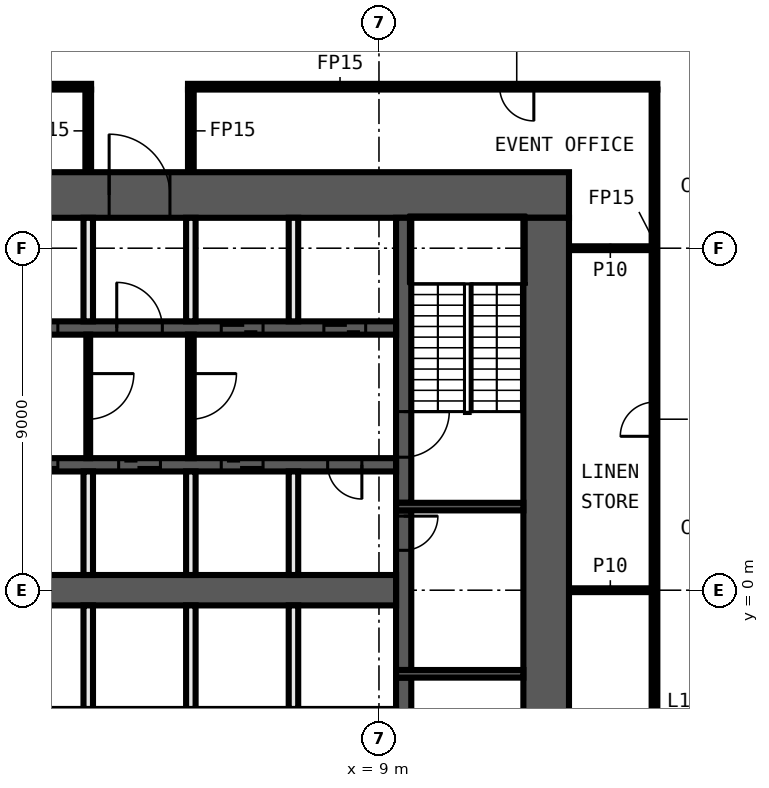
"""IFC4 building model, lengths in metres.
Left out: names, types, materials, properties, quantities, classifications, styles, units other than length and angle.
Written with IfcOpenShell. Run it as: python <this file> out.ifc"""

import sys

from ifc_helpers import new_model, si_unit, direction, frame, frame_2d, origin, place, context, subcontext, project, spatial, rectangle, extrude, element, fill, save


model = new_model("IFC4")
c1 = context("Model", 3, precision=1e-05, world=origin(), true_north=direction((0.0, 1.0)))
c2 = subcontext(c1, "Body", "Model", "MODEL_VIEW")
j1 = project(units=[si_unit("LENGTHUNIT", "METRE"), si_unit("PLANEANGLEUNIT", "RADIAN")], contexts=[c1])
p1 = place(None, origin())
s1 = spatial("IfcSite", under=j1, at=p1, CompositionType="ELEMENT")
p2 = place(p1, origin())
s2 = spatial("IfcBuilding", under=s1, at=p2, CompositionType="ELEMENT")
p3 = place(p2, frame((0.0, 0.0, 84.7)))
s3 = spatial("IfcBuildingStorey", under=s2, at=p3, CompositionType="ELEMENT", Elevation=84.7)
for number, where, z_axis, x_axis in (
    (1, (14.0, 0.0, 0.0), (0.0, 0.0, 1.0), (1.0, 0.0, 0.0)),
    (2, (14.0, 9.0, 0.0), (0.0, 0.0, 1.0), (1.0, 0.0, 0.0)),
):
    element("IfcWall", number, at=place(p3, frame(where, z_axis=z_axis, x_axis=x_axis)), inside=s3, PredefinedType="PARTITIONING", context=c2, shape_type="SweptSolid", body=[
        extrude(rectangle(XDim=2.175, YDim=0.1, at=frame_2d((1.087, 0.0))), origin(), (0.0, 0.0, 1.0), 3.9),
    ])
p4 = place(p3, frame((1.425, 13.25, 0.0), z_axis=(0.0, 0.0, 1.0), x_axis=(-1.0, 0.0, 0.0)))
e3 = element("IfcWall", 3, at=p4, inside=s3, PredefinedType="PARTITIONING", context=c2, shape_type="SweptSolid", body=[
    extrude(rectangle(XDim=17.75, YDim=0.15, at=frame_2d((8.875, 0.0))), origin(), (0.0, 0.0, 1.0), 3.9),
])
p5 = place(p4, frame((5.475, 0.0, 0.0)))
e4 = element("IfcOpeningElement", 4, at=p5, cuts=e3, PredefinedType="OPENING", context=c2, shape_type="SweptSolid", body=[
    extrude(rectangle(XDim=0.9, YDim=2.1, at=frame_2d((0.45, 1.05))), frame((0.0, 0.085, 0.0), z_axis=(0.0, -1.0, 0.0), x_axis=(1.0, 0.0, 0.0)), (0.0, 0.0, 1.0), 0.17),
])
p6 = place(p4, frame((13.6, 0.0, 0.0)))
e5 = element("IfcOpeningElement", 5, at=p6, cuts=e3, PredefinedType="OPENING", context=c2, shape_type="SweptSolid", body=[
    extrude(rectangle(XDim=0.9, YDim=2.1, at=frame_2d((0.45, 1.05))), frame((0.0, 0.085, 0.0), z_axis=(0.0, -1.0, 0.0), x_axis=(1.0, 0.0, 0.0)), (0.0, 0.0, 1.0), 0.17),
])
p7 = place(p3, frame((16.325, 13.25, 0.0), z_axis=(0.0, 0.0, 1.0), x_axis=(-1.0, 0.0, 0.0)))
e6 = element("IfcWall", 6, at=p7, inside=s3, PredefinedType="PARTITIONING", context=c2, shape_type="SweptSolid", body=[
    extrude(rectangle(XDim=12.35, YDim=0.15, at=frame_2d((6.175, 0.0))), origin(), (0.0, 0.0, 1.0), 3.9),
])
p8 = place(p7, frame((3.25, 0.0, 0.0)))
e7 = element("IfcOpeningElement", 7, at=p8, cuts=e6, PredefinedType="OPENING", context=c2, shape_type="SweptSolid", body=[
    extrude(rectangle(XDim=0.9, YDim=2.1, at=frame_2d((0.45, 1.05))), frame((0.0, 0.085, 0.0), z_axis=(0.0, -1.0, 0.0), x_axis=(1.0, 0.0, 0.0)), (0.0, 0.0, 1.0), 0.17),
])
p9 = place(p3, frame((16.25, -13.175, 0.0), z_axis=(0.0, 0.0, 1.0), x_axis=(0.0, 1.0, 0.0)))
e8 = element("IfcWall", 8, at=p9, inside=s3, PredefinedType="PARTITIONING", context=c2, shape_type="SweptSolid", body=[
    extrude(rectangle(XDim=26.35, YDim=0.15, at=frame_2d((13.175, 0.0))), origin(), (0.0, 0.0, 1.0), 3.9),
])
p10 = place(p9, frame((8.225, 0.0, 0.0)))
e9 = element("IfcOpeningElement", 9, at=p10, cuts=e8, PredefinedType="OPENING", context=c2, shape_type="SweptSolid", body=[
    extrude(rectangle(XDim=0.9, YDim=2.1, at=frame_2d((0.45, 1.05))), frame((0.0, 0.085, 0.0), z_axis=(0.0, -1.0, 0.0), x_axis=(1.0, 0.0, 0.0)), (0.0, 0.0, 1.0), 0.17),
])
p11 = place(p9, frame((17.225, 0.0, 0.0)))
e10 = element("IfcOpeningElement", 10, at=p11, cuts=e8, PredefinedType="OPENING", context=c2, shape_type="SweptSolid", body=[
    extrude(rectangle(XDim=0.9, YDim=2.1, at=frame_2d((0.45, 1.05))), frame((0.0, 0.085, 0.0), z_axis=(0.0, -1.0, 0.0), x_axis=(1.0, 0.0, 0.0)), (0.0, 0.0, 1.0), 0.17),
])
for number, where, z_axis, x_axis in (
    (11, (4.05, 11.0, 0.0), (0.0, 0.0, 1.0), (0.0, 1.0, 0.0)),
    (12, (1.35, 11.0, 0.0), (0.0, 0.0, 1.0), (0.0, 1.0, 0.0)),
):
    element("IfcWall", number, at=place(p3, frame(where, z_axis=z_axis, x_axis=x_axis)), inside=s3, PredefinedType="PARTITIONING", context=c2, shape_type="SweptSolid", body=[
        extrude(rectangle(XDim=2.175, YDim=0.15, at=frame_2d((1.087, 0.0))), origin(), (0.0, 0.0, 1.0), 3.9),
    ])
p12 = place(p3, frame((-14.0, 10.4, 0.0), z_axis=(0.0, 0.0, 1.0), x_axis=(1.0, 0.0, 0.0)))
e13 = element("IfcWall", 13, at=p12, inside=s3, PredefinedType="SHEAR", context=c2, shape_type="SweptSolid", body=[
    extrude(rectangle(XDim=28.0, YDim=1.2, at=frame_2d((14.0, 0.0))), origin(), (0.0, 0.0, 1.0), 3.9),
])
p13 = place(p12, frame((15.9, 0.0, 0.0)))
e14 = element("IfcOpeningElement", 14, at=p13, cuts=e13, PredefinedType="OPENING", context=c2, shape_type="SweptSolid", body=[
    extrude(rectangle(XDim=1.6, YDim=2.1, at=frame_2d((0.8, 1.05))), frame((0.0, 0.61, 0.0), z_axis=(0.0, -1.0, 0.0), x_axis=(1.0, 0.0, 0.0)), (0.0, 0.0, 1.0), 1.22),
])
p14 = place(p3, frame((13.4, 9.8, 0.0), z_axis=(0.0, 0.0, 1.0), x_axis=(0.0, -1.0, 0.0)))
e15 = element("IfcWall", 15, at=p14, inside=s3, PredefinedType="SHEAR", context=c2, shape_type="SweptSolid", body=[
    extrude(rectangle(XDim=19.6, YDim=1.2, at=frame_2d((9.8, 0.0))), origin(), (0.0, 0.0, 1.0), 3.9),
])
p15 = place(p3, frame((9.65, -2.3, 0.0), z_axis=(0.0, 0.0, 1.0), x_axis=(0.0, -1.0, 0.0)))
e16 = element("IfcWall", 16, at=p15, inside=s3, PredefinedType="SHEAR", context=c2, shape_type="SweptSolid", body=[
    extrude(rectangle(XDim=7.5, YDim=0.4, at=frame_2d((3.75, 0.0))), origin(), (0.0, 0.0, 1.0), 3.9),
])
p16 = place(p15, frame((1.2, 0.0, 0.0)))
e17 = element("IfcOpeningElement", 17, at=p16, cuts=e16, PredefinedType="OPENING", context=c2, shape_type="SweptSolid", body=[
    extrude(rectangle(XDim=1.2, YDim=2.1, at=frame_2d((0.6, 1.05))), frame((0.0, 0.21, 0.0), z_axis=(0.0, -1.0, 0.0), x_axis=(1.0, 0.0, 0.0)), (0.0, 0.0, 1.0), 0.42),
])
p17 = place(p3, frame((9.65, 2.1, 0.0), z_axis=(0.0, 0.0, 1.0), x_axis=(0.0, -1.0, 0.0)))
e18 = element("IfcWall", 18, at=p17, inside=s3, PredefinedType="SHEAR", context=c2, shape_type="SweptSolid", body=[
    extrude(rectangle(XDim=4.2, YDim=0.4, at=frame_2d((2.1, 0.0))), origin(), (0.0, 0.0, 1.0), 3.9),
])
p18 = place(p17, frame((0.15, 0.0, 0.0)))
e19 = element("IfcOpeningElement", 19, at=p18, cuts=e18, PredefinedType="OPENING", context=c2, shape_type="SweptSolid", body=[
    extrude(rectangle(XDim=0.9, YDim=2.1, at=frame_2d((0.45, 1.05))), frame((0.0, 0.21, 0.0), z_axis=(0.0, -1.0, 0.0), x_axis=(1.0, 0.0, 0.0)), (0.0, 0.0, 1.0), 0.42),
])
p19 = place(p3, frame((9.65, 9.8, 0.0), z_axis=(0.0, 0.0, 1.0), x_axis=(0.0, -1.0, 0.0)))
e20 = element("IfcWall", 20, at=p19, inside=s3, PredefinedType="SHEAR", context=c2, shape_type="SweptSolid", body=[
    extrude(rectangle(XDim=7.5, YDim=0.4, at=frame_2d((3.75, 0.0))), origin(), (0.0, 0.0, 1.0), 3.9),
])
p20 = place(p19, frame((5.1, 0.0, 0.0)))
e21 = element("IfcOpeningElement", 21, at=p20, cuts=e20, PredefinedType="OPENING", context=c2, shape_type="SweptSolid", body=[
    extrude(rectangle(XDim=1.2, YDim=2.1, at=frame_2d((0.6, 1.05))), frame((0.0, 0.21, 0.0), z_axis=(0.0, -1.0, 0.0), x_axis=(1.0, 0.0, 0.0)), (0.0, 0.0, 1.0), 0.42),
])
for number, where, z_axis, x_axis in (
    (22, (9.45, 2.2, 0.0), (0.0, 0.0, 1.0), (1.0, 0.0, 0.0)),
    (23, (9.45, -2.2, 0.0), (0.0, 0.0, 1.0), (1.0, 0.0, 0.0)),
):
    element("IfcWall", number, at=place(p3, frame(where, z_axis=z_axis, x_axis=x_axis)), inside=s3, PredefinedType="SHEAR", context=c2, shape_type="SweptSolid", body=[
        extrude(rectangle(XDim=3.35, YDim=0.2, at=frame_2d((1.675, 0.0))), origin(), (0.0, 0.0, 1.0), 3.9),
    ])
p21 = place(p3, frame((-9.45, 6.9, 0.0), z_axis=(0.0, 0.0, 1.0), x_axis=(1.0, 0.0, 0.0)))
e24 = element("IfcWall", 24, at=p21, inside=s3, PredefinedType="SHEAR", context=c2, shape_type="SweptSolid", body=[
    extrude(rectangle(XDim=18.9, YDim=0.35, at=frame_2d((9.45, 0.0))), origin(), (0.0, 0.0, 1.0), 3.9),
])
p22 = place(p21, frame((0.8, 0.0, 0.0)))
e25 = element("IfcOpeningElement", 25, at=p22, cuts=e24, PredefinedType="OPENING", context=c2, shape_type="SweptSolid", body=[
    extrude(rectangle(XDim=1.1, YDim=2.1, at=frame_2d((0.55, 1.05))), frame((0.0, 0.185, 0.0), z_axis=(0.0, -1.0, 0.0), x_axis=(1.0, 0.0, 0.0)), (0.0, 0.0, 1.0), 0.37),
])
p23 = place(p21, frame((3.5, 0.0, 0.0)))
e26 = element("IfcOpeningElement", 26, at=p23, cuts=e24, PredefinedType="OPENING", context=c2, shape_type="SweptSolid", body=[
    extrude(rectangle(XDim=1.1, YDim=2.1, at=frame_2d((0.55, 1.05))), frame((0.0, 0.185, 0.0), z_axis=(0.0, -1.0, 0.0), x_axis=(1.0, 0.0, 0.0)), (0.0, 0.0, 1.0), 0.37),
])
p24 = place(p21, frame((6.2, 0.0, 0.0)))
e27 = element("IfcOpeningElement", 27, at=p24, cuts=e24, PredefinedType="OPENING", context=c2, shape_type="SweptSolid", body=[
    extrude(rectangle(XDim=1.1, YDim=2.1, at=frame_2d((0.55, 1.05))), frame((0.0, 0.185, 0.0), z_axis=(0.0, -1.0, 0.0), x_axis=(1.0, 0.0, 0.0)), (0.0, 0.0, 1.0), 0.37),
])
p25 = place(p21, frame((8.9, 0.0, 0.0)))
e28 = element("IfcOpeningElement", 28, at=p25, cuts=e24, PredefinedType="OPENING", context=c2, shape_type="SweptSolid", body=[
    extrude(rectangle(XDim=1.1, YDim=2.1, at=frame_2d((0.55, 1.05))), frame((0.0, 0.185, 0.0), z_axis=(0.0, -1.0, 0.0), x_axis=(1.0, 0.0, 0.0)), (0.0, 0.0, 1.0), 0.37),
])
p26 = place(p21, frame((11.55, 0.0, 0.0)))
e29 = element("IfcOpeningElement", 29, at=p26, cuts=e24, PredefinedType="OPENING", context=c2, shape_type="SweptSolid", body=[
    extrude(rectangle(XDim=1.2, YDim=2.1, at=frame_2d((0.6, 1.05))), frame((0.0, 0.185, 0.0), z_axis=(0.0, -1.0, 0.0), x_axis=(1.0, 0.0, 0.0)), (0.0, 0.0, 1.0), 0.37),
])
p27 = place(p21, frame((14.3, 0.0, 0.0)))
e30 = element("IfcOpeningElement", 30, at=p27, cuts=e24, PredefinedType="OPENING", context=c2, shape_type="SweptSolid", body=[
    extrude(rectangle(XDim=1.1, YDim=2.1, at=frame_2d((0.55, 1.05))), frame((0.0, 0.185, 0.0), z_axis=(0.0, -1.0, 0.0), x_axis=(1.0, 0.0, 0.0)), (0.0, 0.0, 1.0), 0.37),
])
p28 = place(p21, frame((17.0, 0.0, 0.0)))
e31 = element("IfcOpeningElement", 31, at=p28, cuts=e24, PredefinedType="OPENING", context=c2, shape_type="SweptSolid", body=[
    extrude(rectangle(XDim=1.1, YDim=2.1, at=frame_2d((0.55, 1.05))), frame((0.0, 0.185, 0.0), z_axis=(0.0, -1.0, 0.0), x_axis=(1.0, 0.0, 0.0)), (0.0, 0.0, 1.0), 0.37),
])
p29 = place(p3, frame((9.45, 3.3, 0.0), z_axis=(0.0, 0.0, 1.0), x_axis=(-1.0, 0.0, 0.0)))
e32 = element("IfcWall", 32, at=p29, inside=s3, PredefinedType="SHEAR", context=c2, shape_type="SweptSolid", body=[
    extrude(rectangle(XDim=18.9, YDim=0.35, at=frame_2d((9.45, 0.0))), origin(), (0.0, 0.0, 1.0), 3.9),
])
p30 = place(p29, frame((17.0, 0.0, 0.0)))
e33 = element("IfcOpeningElement", 33, at=p30, cuts=e32, PredefinedType="OPENING", context=c2, shape_type="SweptSolid", body=[
    extrude(rectangle(XDim=1.1, YDim=2.1, at=frame_2d((0.55, 1.05))), frame((0.0, 0.185, 0.0), z_axis=(0.0, -1.0, 0.0), x_axis=(1.0, 0.0, 0.0)), (0.0, 0.0, 1.0), 0.37),
])
p31 = place(p29, frame((14.3, 0.0, 0.0)))
e34 = element("IfcOpeningElement", 34, at=p31, cuts=e32, PredefinedType="OPENING", context=c2, shape_type="SweptSolid", body=[
    extrude(rectangle(XDim=1.1, YDim=2.1, at=frame_2d((0.55, 1.05))), frame((0.0, 0.185, 0.0), z_axis=(0.0, -1.0, 0.0), x_axis=(1.0, 0.0, 0.0)), (0.0, 0.0, 1.0), 0.37),
])
p32 = place(p29, frame((11.6, 0.0, 0.0)))
e35 = element("IfcOpeningElement", 35, at=p32, cuts=e32, PredefinedType="OPENING", context=c2, shape_type="SweptSolid", body=[
    extrude(rectangle(XDim=1.1, YDim=2.1, at=frame_2d((0.55, 1.05))), frame((0.0, 0.185, 0.0), z_axis=(0.0, -1.0, 0.0), x_axis=(1.0, 0.0, 0.0)), (0.0, 0.0, 1.0), 0.37),
])
p33 = place(p29, frame((8.9, 0.0, 0.0)))
e36 = element("IfcOpeningElement", 36, at=p33, cuts=e32, PredefinedType="OPENING", context=c2, shape_type="SweptSolid", body=[
    extrude(rectangle(XDim=1.1, YDim=2.1, at=frame_2d((0.55, 1.05))), frame((0.0, 0.185, 0.0), z_axis=(0.0, -1.0, 0.0), x_axis=(1.0, 0.0, 0.0)), (0.0, 0.0, 1.0), 0.37),
])
p34 = place(p29, frame((6.2, 0.0, 0.0)))
e37 = element("IfcOpeningElement", 37, at=p34, cuts=e32, PredefinedType="OPENING", context=c2, shape_type="SweptSolid", body=[
    extrude(rectangle(XDim=1.1, YDim=2.1, at=frame_2d((0.55, 1.05))), frame((0.0, 0.185, 0.0), z_axis=(0.0, -1.0, 0.0), x_axis=(1.0, 0.0, 0.0)), (0.0, 0.0, 1.0), 0.37),
])
p35 = place(p29, frame((3.5, 0.0, 0.0)))
e38 = element("IfcOpeningElement", 38, at=p35, cuts=e32, PredefinedType="OPENING", context=c2, shape_type="SweptSolid", body=[
    extrude(rectangle(XDim=1.1, YDim=2.1, at=frame_2d((0.55, 1.05))), frame((0.0, 0.185, 0.0), z_axis=(0.0, -1.0, 0.0), x_axis=(1.0, 0.0, 0.0)), (0.0, 0.0, 1.0), 0.37),
])
p36 = place(p29, frame((0.9, 0.0, 0.0)))
e39 = element("IfcOpeningElement", 39, at=p36, cuts=e32, PredefinedType="OPENING", context=c2, shape_type="SweptSolid", body=[
    extrude(rectangle(XDim=0.9, YDim=2.1, at=frame_2d((0.45, 1.05))), frame((0.0, 0.185, 0.0), z_axis=(0.0, -1.0, 0.0), x_axis=(1.0, 0.0, 0.0)), (0.0, 0.0, 1.0), 0.37),
])
p37 = place(p3, frame((-9.45, 0.0, 0.0), z_axis=(0.0, 0.0, 1.0), x_axis=(1.0, 0.0, 0.0)))
e40 = element("IfcWall", 40, at=p37, inside=s3, PredefinedType="SHEAR", context=c2, shape_type="SweptSolid", body=[
    extrude(rectangle(XDim=18.9, YDim=0.8, at=frame_2d((9.45, 0.0))), origin(), (0.0, 0.0, 1.0), 3.9),
])
for number, where, z_axis, x_axis in (
    (41, (6.75, -3.125, 0.0), (0.0, 0.0, 1.0), (0.0, 1.0, 0.0)),
    (42, (6.75, 0.4, 0.0), (0.0, 0.0, 1.0), (0.0, 1.0, 0.0)),
    (43, (6.75, 7.075, 0.0), (0.0, 0.0, 1.0), (0.0, 1.0, 0.0)),
):
    element("IfcWall", number, at=place(p3, frame(where, z_axis=z_axis, x_axis=x_axis)), inside=s3, PredefinedType="SOLIDWALL", context=c2, shape_type="SweptSolid", body=[
        extrude(rectangle(XDim=2.725, YDim=0.25, at=frame_2d((1.363, 0.0))), origin(), (0.0, 0.0, 1.0), 3.9),
    ])
p38 = place(p3, frame((4.05, 6.725, 0.0), z_axis=(0.0, 0.0, 1.0), x_axis=(0.0, -1.0, 0.0)))
e44 = element("IfcWall", 44, at=p38, inside=s3, PredefinedType="PARTITIONING", context=c2, shape_type="SweptSolid", body=[
    extrude(rectangle(XDim=3.25, YDim=0.15, at=frame_2d((1.625, 0.0))), origin(), (0.0, 0.0, 1.0), 3.9),
])
p39 = place(p38, frame((1.025, 0.0, 0.0)))
e45 = element("IfcOpeningElement", 45, at=p39, cuts=e44, PredefinedType="OPENING", context=c2, shape_type="SweptSolid", body=[
    extrude(rectangle(XDim=1.2, YDim=2.1, at=frame_2d((0.6, 1.05))), frame((0.0, 0.085, 0.0), z_axis=(0.0, -1.0, 0.0), x_axis=(1.0, 0.0, 0.0)), (0.0, 0.0, 1.0), 0.17),
])
for number, where, z_axis, x_axis in (
    (46, (4.05, -3.125, 0.0), (0.0, 0.0, 1.0), (0.0, 1.0, 0.0)),
    (47, (4.05, 0.4, 0.0), (0.0, 0.0, 1.0), (0.0, 1.0, 0.0)),
    (48, (4.05, 7.075, 0.0), (0.0, 0.0, 1.0), (0.0, 1.0, 0.0)),
):
    element("IfcWall", number, at=place(p3, frame(where, z_axis=z_axis, x_axis=x_axis)), inside=s3, PredefinedType="SOLIDWALL", context=c2, shape_type="SweptSolid", body=[
        extrude(rectangle(XDim=2.725, YDim=0.25, at=frame_2d((1.363, 0.0))), origin(), (0.0, 0.0, 1.0), 3.9),
    ])
p40 = place(p3, frame((1.35, 6.725, 0.0), z_axis=(0.0, 0.0, 1.0), x_axis=(0.0, -1.0, 0.0)))
e49 = element("IfcWall", 49, at=p40, inside=s3, PredefinedType="PARTITIONING", context=c2, shape_type="SweptSolid", body=[
    extrude(rectangle(XDim=3.25, YDim=0.1, at=frame_2d((1.625, 0.0))), origin(), (0.0, 0.0, 1.0), 3.9),
])
p41 = place(p40, frame((1.025, 0.0, 0.0)))
e50 = element("IfcOpeningElement", 50, at=p41, cuts=e49, PredefinedType="OPENING", context=c2, shape_type="SweptSolid", body=[
    extrude(rectangle(XDim=1.2, YDim=2.1, at=frame_2d((0.6, 1.05))), frame((0.0, 0.06, 0.0), z_axis=(0.0, -1.0, 0.0), x_axis=(1.0, 0.0, 0.0)), (0.0, 0.0, 1.0), 0.12),
])
for number, where, z_axis, x_axis in (
    (51, (1.35, -3.125, 0.0), (0.0, 0.0, 1.0), (0.0, 1.0, 0.0)),
    (52, (1.35, 0.4, 0.0), (0.0, 0.0, 1.0), (0.0, 1.0, 0.0)),
    (53, (1.35, 7.075, 0.0), (0.0, 0.0, 1.0), (0.0, 1.0, 0.0)),
):
    element("IfcWall", number, at=place(p3, frame(where, z_axis=z_axis, x_axis=x_axis)), inside=s3, PredefinedType="SOLIDWALL", context=c2, shape_type="SweptSolid", body=[
        extrude(rectangle(XDim=2.725, YDim=0.25, at=frame_2d((1.363, 0.0))), origin(), (0.0, 0.0, 1.0), 3.9),
    ])
p42 = place(p11, origin())
e54 = element("IfcDoor", 54, at=p42, inside=s3, OperationType="SINGLE_SWING_LEFT", PredefinedType="DOOR", context=c2, shape_type="SweptSolid", body=[
    extrude(rectangle(XDim=0.9, YDim=2.1, at=frame_2d((0.45, 1.05))), frame((0.0, 0.025, 0.0), z_axis=(0.0, -1.0, 0.0), x_axis=(1.0, 0.0, 0.0)), (0.0, 0.0, 1.0), 0.05),
])
fill(e10, e54)
p43 = place(p8, origin())
e55 = element("IfcDoor", 55, at=p43, inside=s3, OperationType="SINGLE_SWING_RIGHT", PredefinedType="DOOR", context=c2, shape_type="SweptSolid", body=[
    extrude(rectangle(XDim=0.9, YDim=2.1, at=frame_2d((0.45, 1.05))), frame((0.0, 0.025, 0.0), z_axis=(0.0, -1.0, 0.0), x_axis=(1.0, 0.0, 0.0)), (0.0, 0.0, 1.0), 0.05),
])
fill(e7, e55)
p44 = place(p18, origin())
e56 = element("IfcDoor", 56, at=p44, inside=s3, OperationType="SINGLE_SWING_RIGHT", PredefinedType="DOOR", context=c2, shape_type="SweptSolid", body=[
    extrude(rectangle(XDim=0.9, YDim=2.1, at=frame_2d((0.45, 1.05))), frame((0.0, 0.025, 0.0), z_axis=(0.0, -1.0, 0.0), x_axis=(1.0, 0.0, 0.0)), (0.0, 0.0, 1.0), 0.05),
])
fill(e19, e56)
p45 = place(p25, origin())
e57 = element("IfcDoor", 57, at=p45, inside=s3, OperationType="DOUBLE_DOOR_SLIDING", PredefinedType="DOOR", context=c2, shape_type="SweptSolid", body=[
    extrude(rectangle(XDim=1.1, YDim=2.1, at=frame_2d((0.55, 1.05))), frame((0.0, 0.025, 0.0), z_axis=(0.0, -1.0, 0.0), x_axis=(1.0, 0.0, 0.0)), (0.0, 0.0, 1.0), 0.05),
])
fill(e28, e57)
p46 = place(p13, origin())
e58 = element("IfcDoor", 58, at=p46, inside=s3, OperationType="DOUBLE_DOOR_SINGLE_SWING", PredefinedType="DOOR", context=c2, shape_type="SweptSolid", body=[
    extrude(rectangle(XDim=1.6, YDim=2.1, at=frame_2d((0.8, 1.05))), frame((0.0, 0.025, 0.0), z_axis=(0.0, -1.0, 0.0), x_axis=(1.0, 0.0, 0.0)), (0.0, 0.0, 1.0), 0.05),
])
fill(e14, e58)
p47 = place(p26, origin())
e59 = element("IfcDoor", 59, at=p47, inside=s3, OperationType="SINGLE_SWING_LEFT", PredefinedType="DOOR", context=c2, shape_type="SweptSolid", body=[
    extrude(rectangle(XDim=1.2, YDim=2.1, at=frame_2d((0.6, 1.05))), frame((0.0, 0.025, 0.0), z_axis=(0.0, -1.0, 0.0), x_axis=(1.0, 0.0, 0.0)), (0.0, 0.0, 1.0), 0.05),
])
fill(e29, e59)
p48 = place(p27, origin())
e60 = element("IfcDoor", 60, at=p48, inside=s3, OperationType="DOUBLE_DOOR_SLIDING", PredefinedType="DOOR", context=c2, shape_type="SweptSolid", body=[
    extrude(rectangle(XDim=1.1, YDim=2.1, at=frame_2d((0.55, 1.05))), frame((0.0, 0.025, 0.0), z_axis=(0.0, -1.0, 0.0), x_axis=(1.0, 0.0, 0.0)), (0.0, 0.0, 1.0), 0.05),
])
fill(e30, e60)
p49 = place(p28, origin())
e61 = element("IfcDoor", 61, at=p49, inside=s3, OperationType="DOUBLE_DOOR_SLIDING", PredefinedType="DOOR", context=c2, shape_type="SweptSolid", body=[
    extrude(rectangle(XDim=1.1, YDim=2.1, at=frame_2d((0.55, 1.05))), frame((0.0, 0.025, 0.0), z_axis=(0.0, -1.0, 0.0), x_axis=(1.0, 0.0, 0.0)), (0.0, 0.0, 1.0), 0.05),
])
fill(e31, e61)
p50 = place(p33, origin())
e62 = element("IfcDoor", 62, at=p50, inside=s3, OperationType="DOUBLE_DOOR_SLIDING", PredefinedType="DOOR", context=c2, shape_type="SweptSolid", body=[
    extrude(rectangle(XDim=1.1, YDim=2.1, at=frame_2d((0.55, 1.05))), frame((0.0, 0.025, 0.0), z_axis=(0.0, -1.0, 0.0), x_axis=(1.0, 0.0, 0.0)), (0.0, 0.0, 1.0), 0.05),
])
fill(e36, e62)
p51 = place(p34, origin())
e63 = element("IfcDoor", 63, at=p51, inside=s3, OperationType="DOUBLE_DOOR_SLIDING", PredefinedType="DOOR", context=c2, shape_type="SweptSolid", body=[
    extrude(rectangle(XDim=1.1, YDim=2.1, at=frame_2d((0.55, 1.05))), frame((0.0, 0.025, 0.0), z_axis=(0.0, -1.0, 0.0), x_axis=(1.0, 0.0, 0.0)), (0.0, 0.0, 1.0), 0.05),
])
fill(e37, e63)
p52 = place(p35, origin())
e64 = element("IfcDoor", 64, at=p52, inside=s3, OperationType="DOUBLE_DOOR_SLIDING", PredefinedType="DOOR", context=c2, shape_type="SweptSolid", body=[
    extrude(rectangle(XDim=1.1, YDim=2.1, at=frame_2d((0.55, 1.05))), frame((0.0, 0.025, 0.0), z_axis=(0.0, -1.0, 0.0), x_axis=(1.0, 0.0, 0.0)), (0.0, 0.0, 1.0), 0.05),
])
fill(e38, e64)
p53 = place(p36, origin())
e65 = element("IfcDoor", 65, at=p53, inside=s3, OperationType="SINGLE_SWING_LEFT", PredefinedType="DOOR", context=c2, shape_type="SweptSolid", body=[
    extrude(rectangle(XDim=0.9, YDim=2.1, at=frame_2d((0.45, 1.05))), frame((0.0, 0.025, 0.0), z_axis=(0.0, -1.0, 0.0), x_axis=(1.0, 0.0, 0.0)), (0.0, 0.0, 1.0), 0.05),
])
fill(e39, e65)
p54 = place(p20, origin())
e66 = element("IfcDoor", 66, at=p54, inside=s3, OperationType="SINGLE_SWING_LEFT", PredefinedType="DOOR", context=c2, shape_type="SweptSolid", body=[
    extrude(rectangle(XDim=1.2, YDim=2.1, at=frame_2d((0.6, 1.05))), frame((0.0, 0.025, 0.0), z_axis=(0.0, -1.0, 0.0), x_axis=(1.0, 0.0, 0.0)), (0.0, 0.0, 1.0), 0.05),
])
fill(e21, e66)
p55 = place(p41, origin())
e67 = element("IfcDoor", 67, at=p55, inside=s3, OperationType="SINGLE_SWING_LEFT", PredefinedType="DOOR", context=c2, shape_type="SweptSolid", body=[
    extrude(rectangle(XDim=1.2, YDim=2.1, at=frame_2d((0.6, 1.05))), frame((0.0, 0.025, 0.0), z_axis=(0.0, -1.0, 0.0), x_axis=(1.0, 0.0, 0.0)), (0.0, 0.0, 1.0), 0.05),
])
fill(e50, e67)
p56 = place(p39, origin())
e68 = element("IfcDoor", 68, at=p56, inside=s3, OperationType="SINGLE_SWING_RIGHT", PredefinedType="DOOR", context=c2, shape_type="SweptSolid", body=[
    extrude(rectangle(XDim=1.2, YDim=2.1, at=frame_2d((0.6, 1.05))), frame((0.0, 0.025, 0.0), z_axis=(0.0, -1.0, 0.0), x_axis=(1.0, 0.0, 0.0)), (0.0, 0.0, 1.0), 0.05),
])
fill(e45, e68)
save(model, sys.argv[1])
